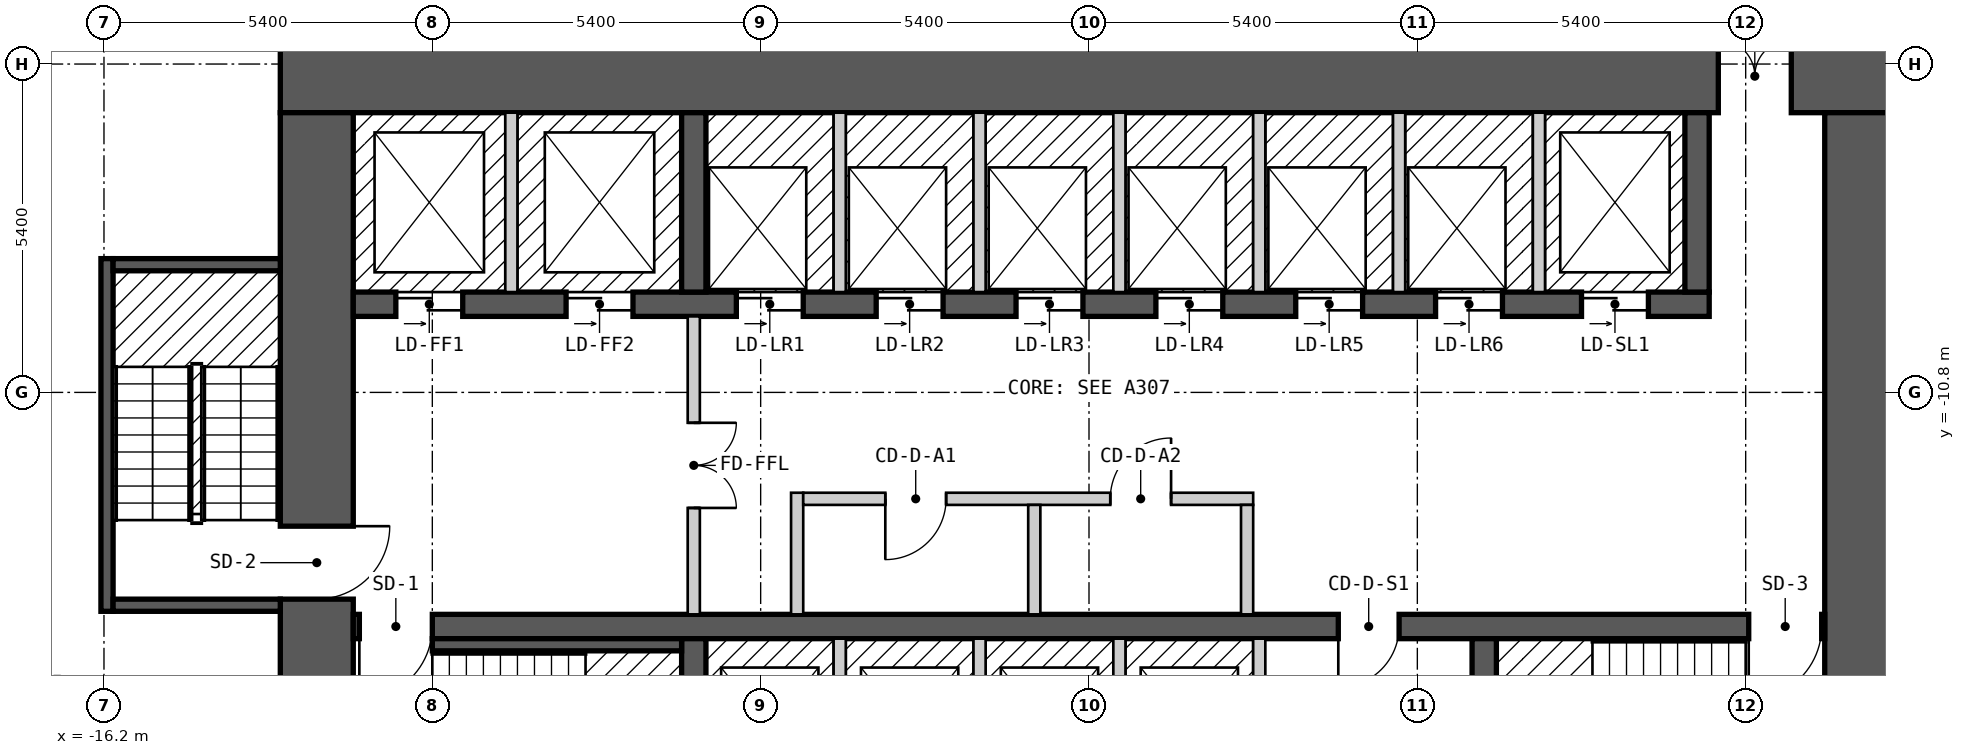
"""IFC4 building model, lengths in metres.
Left out: names, types, materials, properties, quantities, classifications, styles, units other than length and angle.
Written with IfcOpenShell. Run it as: python <this file> out.ifc"""

import sys

from ifc_helpers import new_model, si_unit, direction, frame, frame_2d, origin, place, context, subcontext, project, spatial, rectangle, extrude, element, fill, save


model = new_model("IFC4")
c1 = context("Model", 3, precision=1e-05, world=origin(), true_north=direction((0.0, 1.0)))
c2 = subcontext(c1, "Body", "Model", "MODEL_VIEW")
j1 = project(units=[si_unit("LENGTHUNIT", "METRE"), si_unit("PLANEANGLEUNIT", "RADIAN")], contexts=[c1])
p1 = place(None, origin())
s1 = spatial("IfcSite", under=j1, at=p1, CompositionType="ELEMENT")
p2 = place(p1, origin())
s2 = spatial("IfcBuilding", under=s1, at=p2, CompositionType="ELEMENT")
p3 = place(p2, frame((0.0, 0.0, 16.2)))
s3 = spatial("IfcBuildingStorey", under=s2, at=p3, CompositionType="ELEMENT", Elevation=16.2)
p4 = place(p3, frame((-13.3, -5.6, 0.0), z_axis=(0.0, 0.0, 1.0), x_axis=(1.0, 0.0, 0.0)))
e1 = element("IfcWall", 1, at=p4, inside=s3, PredefinedType="SHEAR", context=c2, shape_type="SweptSolid", body=[
    extrude(rectangle(XDim=26.6, YDim=1.2, at=frame_2d((13.3, 0.0))), origin(), (0.0, 0.0, 1.0), 3.25),
])
p5 = place(p4, frame((23.65, 0.0, 0.0)))
e2 = element("IfcOpeningElement", 2, at=p5, cuts=e1, PredefinedType="OPENING", context=c2, shape_type="SweptSolid", body=[
    extrude(rectangle(XDim=1.2, YDim=2.1, at=frame_2d((0.6, 1.05))), frame((0.0, 0.61, 0.0), z_axis=(0.0, -1.0, 0.0), x_axis=(1.0, 0.0, 0.0)), (0.0, 0.0, 1.0), 1.22),
])
p6 = place(p3, frame((-12.7, -17.8, 0.0), z_axis=(0.0, 0.0, 1.0), x_axis=(0.0, 1.0, 0.0)))
e3 = element("IfcWall", 3, at=p6, inside=s3, PredefinedType="SHEAR", context=c2, shape_type="SweptSolid", body=[
    extrude(rectangle(XDim=11.6, YDim=1.2, at=frame_2d((5.8, 0.0))), origin(), (0.0, 0.0, 1.0), 3.25),
])
p7 = place(p6, frame((3.6, 0.0, 0.0)))
e4 = element("IfcOpeningElement", 4, at=p7, cuts=e3, PredefinedType="OPENING", context=c2, shape_type="SweptSolid", body=[
    extrude(rectangle(XDim=1.2, YDim=2.1, at=frame_2d((0.6, 1.05))), frame((0.0, 0.61, 0.0), z_axis=(0.0, -1.0, 0.0), x_axis=(1.0, 0.0, 0.0)), (0.0, 0.0, 1.0), 1.22),
])
p8 = place(p3, frame((12.7, -17.8, 0.0), z_axis=(0.0, 0.0, 1.0), x_axis=(0.0, 1.0, 0.0)))
e5 = element("IfcWall", 5, at=p8, inside=s3, PredefinedType="SHEAR", context=c2, shape_type="SweptSolid", body=[
    extrude(rectangle(XDim=11.6, YDim=1.2, at=frame_2d((5.8, 0.0))), origin(), (0.0, 0.0, 1.0), 3.25),
])
p9 = place(p3, frame((-12.1, -14.65, 0.0), z_axis=(0.0, 0.0, 1.0), x_axis=(1.0, 0.0, 0.0)))
e6 = element("IfcWall", 6, at=p9, inside=s3, PredefinedType="SHEAR", context=c2, shape_type="SweptSolid", body=[
    extrude(rectangle(XDim=24.2, YDim=0.4, at=frame_2d((12.1, 0.0))), origin(), (0.0, 0.0, 1.0), 3.25),
])
p10 = place(p9, frame((1.3, 0.0, 0.0), z_axis=(0.0, 0.0, 1.0), x_axis=(-1.0, 0.0, 0.0)))
e7 = element("IfcOpeningElement", 7, at=p10, cuts=e6, PredefinedType="OPENING", context=c2, shape_type="SweptSolid", body=[
    extrude(rectangle(XDim=1.2, YDim=2.1, at=frame_2d((0.6, 1.05))), frame((0.0, 0.21, 0.0), z_axis=(0.0, -1.0, 0.0), x_axis=(1.0, 0.0, 0.0)), (0.0, 0.0, 1.0), 0.42),
])
p11 = place(p9, frame((24.15, 0.0, 0.0), z_axis=(0.0, 0.0, 1.0), x_axis=(-1.0, 0.0, 0.0)))
e8 = element("IfcOpeningElement", 8, at=p11, cuts=e6, PredefinedType="OPENING", context=c2, shape_type="SweptSolid", body=[
    extrude(rectangle(XDim=1.2, YDim=2.1, at=frame_2d((0.6, 1.05))), frame((0.0, 0.21, 0.0), z_axis=(0.0, -1.0, 0.0), x_axis=(1.0, 0.0, 0.0)), (0.0, 0.0, 1.0), 0.42),
])
p12 = place(p9, frame((17.2, 0.0, 0.0), z_axis=(0.0, 0.0, 1.0), x_axis=(-1.0, 0.0, 0.0)))
e9 = element("IfcOpeningElement", 9, at=p12, cuts=e6, PredefinedType="OPENING", context=c2, shape_type="SweptSolid", body=[
    extrude(rectangle(XDim=1.0, YDim=2.1, at=frame_2d((0.5, 1.05))), frame((0.0, 0.21, 0.0), z_axis=(0.0, -1.0, 0.0), x_axis=(1.0, 0.0, 0.0)), (0.0, 0.0, 1.0), 0.42),
])
p13 = place(p3, frame((-12.1, -9.35, 0.0), z_axis=(0.0, 0.0, 1.0), x_axis=(1.0, 0.0, 0.0)))
e10 = element("IfcWall", 10, at=p13, inside=s3, PredefinedType="SHEAR", context=c2, shape_type="SweptSolid", body=[
    extrude(rectangle(XDim=22.3, YDim=0.4, at=frame_2d((11.15, 0.0))), origin(), (0.0, 0.0, 1.0), 3.25),
])
p14 = place(p13, frame((0.7, 0.0, 0.0)))
e11 = element("IfcOpeningElement", 11, at=p14, cuts=e10, PredefinedType="OPENING", context=c2, shape_type="SweptSolid", body=[
    extrude(rectangle(XDim=1.1, YDim=2.1, at=frame_2d((0.55, 1.05))), frame((0.0, 0.21, 0.0), z_axis=(0.0, -1.0, 0.0), x_axis=(1.0, 0.0, 0.0)), (0.0, 0.0, 1.0), 0.42),
])
p15 = place(p13, frame((3.5, 0.0, 0.0)))
e12 = element("IfcOpeningElement", 12, at=p15, cuts=e10, PredefinedType="OPENING", context=c2, shape_type="SweptSolid", body=[
    extrude(rectangle(XDim=1.1, YDim=2.1, at=frame_2d((0.55, 1.05))), frame((0.0, 0.21, 0.0), z_axis=(0.0, -1.0, 0.0), x_axis=(1.0, 0.0, 0.0)), (0.0, 0.0, 1.0), 0.42),
])
p16 = place(p13, frame((6.3, 0.0, 0.0)))
e13 = element("IfcOpeningElement", 13, at=p16, cuts=e10, PredefinedType="OPENING", context=c2, shape_type="SweptSolid", body=[
    extrude(rectangle(XDim=1.1, YDim=2.1, at=frame_2d((0.55, 1.05))), frame((0.0, 0.21, 0.0), z_axis=(0.0, -1.0, 0.0), x_axis=(1.0, 0.0, 0.0)), (0.0, 0.0, 1.0), 0.42),
])
p17 = place(p13, frame((8.6, 0.0, 0.0)))
e14 = element("IfcOpeningElement", 14, at=p17, cuts=e10, PredefinedType="OPENING", context=c2, shape_type="SweptSolid", body=[
    extrude(rectangle(XDim=1.1, YDim=2.1, at=frame_2d((0.55, 1.05))), frame((0.0, 0.21, 0.0), z_axis=(0.0, -1.0, 0.0), x_axis=(1.0, 0.0, 0.0)), (0.0, 0.0, 1.0), 0.42),
])
p18 = place(p13, frame((10.9, 0.0, 0.0)))
e15 = element("IfcOpeningElement", 15, at=p18, cuts=e10, PredefinedType="OPENING", context=c2, shape_type="SweptSolid", body=[
    extrude(rectangle(XDim=1.1, YDim=2.1, at=frame_2d((0.55, 1.05))), frame((0.0, 0.21, 0.0), z_axis=(0.0, -1.0, 0.0), x_axis=(1.0, 0.0, 0.0)), (0.0, 0.0, 1.0), 0.42),
])
p19 = place(p13, frame((13.2, 0.0, 0.0)))
e16 = element("IfcOpeningElement", 16, at=p19, cuts=e10, PredefinedType="OPENING", context=c2, shape_type="SweptSolid", body=[
    extrude(rectangle(XDim=1.1, YDim=2.1, at=frame_2d((0.55, 1.05))), frame((0.0, 0.21, 0.0), z_axis=(0.0, -1.0, 0.0), x_axis=(1.0, 0.0, 0.0)), (0.0, 0.0, 1.0), 0.42),
])
p20 = place(p13, frame((15.5, 0.0, 0.0)))
e17 = element("IfcOpeningElement", 17, at=p20, cuts=e10, PredefinedType="OPENING", context=c2, shape_type="SweptSolid", body=[
    extrude(rectangle(XDim=1.1, YDim=2.1, at=frame_2d((0.55, 1.05))), frame((0.0, 0.21, 0.0), z_axis=(0.0, -1.0, 0.0), x_axis=(1.0, 0.0, 0.0)), (0.0, 0.0, 1.0), 0.42),
])
p21 = place(p13, frame((17.8, 0.0, 0.0)))
e18 = element("IfcOpeningElement", 18, at=p21, cuts=e10, PredefinedType="OPENING", context=c2, shape_type="SweptSolid", body=[
    extrude(rectangle(XDim=1.1, YDim=2.1, at=frame_2d((0.55, 1.05))), frame((0.0, 0.21, 0.0), z_axis=(0.0, -1.0, 0.0), x_axis=(1.0, 0.0, 0.0)), (0.0, 0.0, 1.0), 0.42),
])
p22 = place(p13, frame((20.2, 0.0, 0.0)))
e19 = element("IfcOpeningElement", 19, at=p22, cuts=e10, PredefinedType="OPENING", context=c2, shape_type="SweptSolid", body=[
    extrude(rectangle(XDim=1.1, YDim=2.1, at=frame_2d((0.55, 1.05))), frame((0.0, 0.21, 0.0), z_axis=(0.0, -1.0, 0.0), x_axis=(1.0, 0.0, 0.0)), (0.0, 0.0, 1.0), 0.42),
])
for number, where, z_axis, x_axis in (
    (20, (-6.5, -17.8, 0.0), (0.0, 0.0, 1.0), (0.0, 1.0, 0.0)),
    (21, (6.5, -17.8, 0.0), (0.0, 0.0, 1.0), (0.0, 1.0, 0.0)),
    (22, (-6.5, -9.15, 0.0), (0.0, 0.0, 1.0), (0.0, 1.0, 0.0)),
    (23, (10.0, -9.15, 0.0), (0.0, 0.0, 1.0), (0.0, 1.0, 0.0)),
):
    element("IfcWall", number, at=place(p3, frame(where, z_axis=z_axis, x_axis=x_axis)), inside=s3, PredefinedType="SHEAR", context=c2, shape_type="SweptSolid", body=[
        extrude(rectangle(XDim=2.95, YDim=0.4, at=frame_2d((1.475, 0.0))), origin(), (0.0, 0.0, 1.0), 3.25),
    ])
p23 = place(p3, frame((-16.15, -14.4, 0.0), z_axis=(0.0, 0.0, 1.0), x_axis=(0.0, 1.0, 0.0)))
e24 = element("IfcWall", 24, at=p23, inside=s3, PredefinedType="SOLIDWALL", context=c2, shape_type="SweptSolid", body=[
    extrude(rectangle(XDim=5.8, YDim=0.2, at=frame_2d((2.9, 0.0))), origin(), (0.0, 0.0, 1.0), 3.25),
])
for number, where, z_axis, x_axis in (
    (25, (-16.05, -14.3, 0.0), (0.0, 0.0, 1.0), (1.0, 0.0, 0.0)),
    (26, (-16.05, -8.7, 0.0), (0.0, 0.0, 1.0), (1.0, 0.0, 0.0)),
):
    element("IfcWall", number, at=place(p3, frame(where, z_axis=z_axis, x_axis=x_axis)), inside=s3, PredefinedType="SOLIDWALL", context=c2, shape_type="SweptSolid", body=[
        extrude(rectangle(XDim=2.75, YDim=0.2, at=frame_2d((1.375, 0.0))), origin(), (0.0, 0.0, 1.0), 3.25),
    ])
p24 = place(p3, frame((-10.8, -14.95, 0.0), z_axis=(0.0, 0.0, 1.0), x_axis=(1.0, 0.0, 0.0)))
e27 = element("IfcWall", 27, at=p24, inside=s3, PredefinedType="SOLIDWALL", context=c2, shape_type="SweptSolid", body=[
    extrude(rectangle(XDim=4.1, YDim=0.2, at=frame_2d((2.05, 0.0))), origin(), (0.0, 0.0, 1.0), 3.25),
])
p25 = place(p3, frame((-9.5, -9.15, 0.0), z_axis=(0.0, 0.0, 1.0), x_axis=(0.0, 1.0, 0.0)))
e28 = element("IfcWall", 28, at=p25, inside=s3, PredefinedType="SOLIDWALL", context=c2, shape_type="SweptSolid", body=[
    extrude(rectangle(XDim=2.95, YDim=0.2, at=frame_2d((1.475, 0.0))), origin(), (0.0, 0.0, 1.0), 3.25),
])
p26 = place(p3, frame((-6.5, -14.45, 0.0), z_axis=(0.0, 0.0, 1.0), x_axis=(0.0, 1.0, 0.0)))
e29 = element("IfcWall", 29, at=p26, inside=s3, PredefinedType="PARTITIONING", context=c2, shape_type="SweptSolid", body=[
    extrude(rectangle(XDim=4.9, YDim=0.2, at=frame_2d((2.45, 0.0))), origin(), (0.0, 0.0, 1.0), 3.25),
])
p27 = place(p26, frame((3.15, 0.0, 0.0), z_axis=(0.0, 0.0, 1.0), x_axis=(-1.0, 0.0, 0.0)))
e30 = element("IfcOpeningElement", 30, at=p27, cuts=e29, PredefinedType="OPENING", context=c2, shape_type="SweptSolid", body=[
    extrude(rectangle(XDim=1.4, YDim=2.1, at=frame_2d((0.7, 1.05))), frame((0.0, 0.11, 0.0), z_axis=(0.0, -1.0, 0.0), x_axis=(1.0, 0.0, 0.0)), (0.0, 0.0, 1.0), 0.22),
])
p28 = place(p3, frame((-4.8, -14.45, 0.0), z_axis=(0.0, 0.0, 1.0), x_axis=(0.0, 1.0, 0.0)))
e31 = element("IfcWall", 31, at=p28, inside=s3, PredefinedType="PARTITIONING", context=c2, shape_type="SweptSolid", body=[
    extrude(rectangle(XDim=2.0, YDim=0.2, at=frame_2d((1.0, 0.0))), origin(), (0.0, 0.0, 1.0), 3.25),
])
p29 = place(p3, frame((-4.7, -12.55, 0.0), z_axis=(0.0, 0.0, 1.0), x_axis=(1.0, 0.0, 0.0)))
e32 = element("IfcWall", 32, at=p29, inside=s3, PredefinedType="PARTITIONING", context=c2, shape_type="SweptSolid", body=[
    extrude(rectangle(XDim=7.4, YDim=0.2, at=frame_2d((3.7, 0.0))), origin(), (0.0, 0.0, 1.0), 3.25),
])
p30 = place(p29, frame((2.35, 0.0, 0.0), z_axis=(0.0, 0.0, 1.0), x_axis=(-1.0, 0.0, 0.0)))
e33 = element("IfcOpeningElement", 33, at=p30, cuts=e32, PredefinedType="OPENING", context=c2, shape_type="SweptSolid", body=[
    extrude(rectangle(XDim=1.0, YDim=2.1, at=frame_2d((0.5, 1.05))), frame((0.0, 0.11, 0.0), z_axis=(0.0, -1.0, 0.0), x_axis=(1.0, 0.0, 0.0)), (0.0, 0.0, 1.0), 0.22),
])
p31 = place(p29, frame((6.05, 0.0, 0.0), z_axis=(0.0, 0.0, 1.0), x_axis=(-1.0, 0.0, 0.0)))
e34 = element("IfcOpeningElement", 34, at=p31, cuts=e32, PredefinedType="OPENING", context=c2, shape_type="SweptSolid", body=[
    extrude(rectangle(XDim=1.0, YDim=2.1, at=frame_2d((0.5, 1.05))), frame((0.0, 0.11, 0.0), z_axis=(0.0, -1.0, 0.0), x_axis=(1.0, 0.0, 0.0)), (0.0, 0.0, 1.0), 0.22),
])
for number, where, z_axis, x_axis in (
    (35, (-4.1, -17.8, 0.0), (0.0, 0.0, 1.0), (0.0, 1.0, 0.0)),
    (36, (-4.1, -9.15, 0.0), (0.0, 0.0, 1.0), (0.0, 1.0, 0.0)),
    (37, (-1.8, -17.8, 0.0), (0.0, 0.0, 1.0), (0.0, 1.0, 0.0)),
    (38, (-1.8, -9.15, 0.0), (0.0, 0.0, 1.0), (0.0, 1.0, 0.0)),
):
    element("IfcWall", number, at=place(p3, frame(where, z_axis=z_axis, x_axis=x_axis)), inside=s3, PredefinedType="SOLIDWALL", context=c2, shape_type="SweptSolid", body=[
        extrude(rectangle(XDim=2.95, YDim=0.2, at=frame_2d((1.475, 0.0))), origin(), (0.0, 0.0, 1.0), 3.25),
    ])
p32 = place(p3, frame((-0.9, -14.45, 0.0), z_axis=(0.0, 0.0, 1.0), x_axis=(0.0, 1.0, 0.0)))
e39 = element("IfcWall", 39, at=p32, inside=s3, PredefinedType="PARTITIONING", context=c2, shape_type="SweptSolid", body=[
    extrude(rectangle(XDim=1.8, YDim=0.2, at=frame_2d((0.9, 0.0))), origin(), (0.0, 0.0, 1.0), 3.25),
])
for number, where, z_axis, x_axis in (
    (40, (0.5, -17.8, 0.0), (0.0, 0.0, 1.0), (0.0, 1.0, 0.0)),
    (41, (0.5, -9.15, 0.0), (0.0, 0.0, 1.0), (0.0, 1.0, 0.0)),
):
    element("IfcWall", number, at=place(p3, frame(where, z_axis=z_axis, x_axis=x_axis)), inside=s3, PredefinedType="SOLIDWALL", context=c2, shape_type="SweptSolid", body=[
        extrude(rectangle(XDim=2.95, YDim=0.2, at=frame_2d((1.475, 0.0))), origin(), (0.0, 0.0, 1.0), 3.25),
    ])
p33 = place(p3, frame((2.6, -14.45, 0.0), z_axis=(0.0, 0.0, 1.0), x_axis=(0.0, 1.0, 0.0)))
e42 = element("IfcWall", 42, at=p33, inside=s3, PredefinedType="PARTITIONING", context=c2, shape_type="SweptSolid", body=[
    extrude(rectangle(XDim=1.8, YDim=0.2, at=frame_2d((0.9, 0.0))), origin(), (0.0, 0.0, 1.0), 3.25),
])
for number, where, z_axis, x_axis in (
    (43, (2.8, -17.8, 0.0), (0.0, 0.0, 1.0), (0.0, 1.0, 0.0)),
    (44, (2.8, -9.15, 0.0), (0.0, 0.0, 1.0), (0.0, 1.0, 0.0)),
    (45, (5.1, -9.15, 0.0), (0.0, 0.0, 1.0), (0.0, 1.0, 0.0)),
    (46, (7.4, -9.15, 0.0), (0.0, 0.0, 1.0), (0.0, 1.0, 0.0)),
):
    element("IfcWall", number, at=place(p3, frame(where, z_axis=z_axis, x_axis=x_axis)), inside=s3, PredefinedType="SOLIDWALL", context=c2, shape_type="SweptSolid", body=[
        extrude(rectangle(XDim=2.95, YDim=0.2, at=frame_2d((1.475, 0.0))), origin(), (0.0, 0.0, 1.0), 3.25),
    ])
p34 = place(p14, origin())
e47 = element("IfcDoor", 47, at=p34, inside=s3, OperationType="DOUBLE_DOOR_SLIDING", PredefinedType="DOOR", context=c2, shape_type="SweptSolid", body=[
    extrude(rectangle(XDim=1.1, YDim=2.1, at=frame_2d((0.55, 1.05))), frame((0.0, 0.025, 0.0), z_axis=(0.0, -1.0, 0.0), x_axis=(1.0, 0.0, 0.0)), (0.0, 0.0, 1.0), 0.05),
])
fill(e11, e47)
p35 = place(p15, origin())
e48 = element("IfcDoor", 48, at=p35, inside=s3, OperationType="DOUBLE_DOOR_SLIDING", PredefinedType="DOOR", context=c2, shape_type="SweptSolid", body=[
    extrude(rectangle(XDim=1.1, YDim=2.1, at=frame_2d((0.55, 1.05))), frame((0.0, 0.025, 0.0), z_axis=(0.0, -1.0, 0.0), x_axis=(1.0, 0.0, 0.0)), (0.0, 0.0, 1.0), 0.05),
])
fill(e12, e48)
p36 = place(p16, origin())
e49 = element("IfcDoor", 49, at=p36, inside=s3, OperationType="DOUBLE_DOOR_SLIDING", PredefinedType="DOOR", context=c2, shape_type="SweptSolid", body=[
    extrude(rectangle(XDim=1.1, YDim=2.1, at=frame_2d((0.55, 1.05))), frame((0.0, 0.025, 0.0), z_axis=(0.0, -1.0, 0.0), x_axis=(1.0, 0.0, 0.0)), (0.0, 0.0, 1.0), 0.05),
])
fill(e13, e49)
p37 = place(p17, origin())
e50 = element("IfcDoor", 50, at=p37, inside=s3, OperationType="DOUBLE_DOOR_SLIDING", PredefinedType="DOOR", context=c2, shape_type="SweptSolid", body=[
    extrude(rectangle(XDim=1.1, YDim=2.1, at=frame_2d((0.55, 1.05))), frame((0.0, 0.025, 0.0), z_axis=(0.0, -1.0, 0.0), x_axis=(1.0, 0.0, 0.0)), (0.0, 0.0, 1.0), 0.05),
])
fill(e14, e50)
p38 = place(p18, origin())
e51 = element("IfcDoor", 51, at=p38, inside=s3, OperationType="DOUBLE_DOOR_SLIDING", PredefinedType="DOOR", context=c2, shape_type="SweptSolid", body=[
    extrude(rectangle(XDim=1.1, YDim=2.1, at=frame_2d((0.55, 1.05))), frame((0.0, 0.025, 0.0), z_axis=(0.0, -1.0, 0.0), x_axis=(1.0, 0.0, 0.0)), (0.0, 0.0, 1.0), 0.05),
])
fill(e15, e51)
p39 = place(p19, origin())
e52 = element("IfcDoor", 52, at=p39, inside=s3, OperationType="DOUBLE_DOOR_SLIDING", PredefinedType="DOOR", context=c2, shape_type="SweptSolid", body=[
    extrude(rectangle(XDim=1.1, YDim=2.1, at=frame_2d((0.55, 1.05))), frame((0.0, 0.025, 0.0), z_axis=(0.0, -1.0, 0.0), x_axis=(1.0, 0.0, 0.0)), (0.0, 0.0, 1.0), 0.05),
])
fill(e16, e52)
p40 = place(p20, origin())
e53 = element("IfcDoor", 53, at=p40, inside=s3, OperationType="DOUBLE_DOOR_SLIDING", PredefinedType="DOOR", context=c2, shape_type="SweptSolid", body=[
    extrude(rectangle(XDim=1.1, YDim=2.1, at=frame_2d((0.55, 1.05))), frame((0.0, 0.025, 0.0), z_axis=(0.0, -1.0, 0.0), x_axis=(1.0, 0.0, 0.0)), (0.0, 0.0, 1.0), 0.05),
])
fill(e17, e53)
p41 = place(p21, origin())
e54 = element("IfcDoor", 54, at=p41, inside=s3, OperationType="DOUBLE_DOOR_SLIDING", PredefinedType="DOOR", context=c2, shape_type="SweptSolid", body=[
    extrude(rectangle(XDim=1.1, YDim=2.1, at=frame_2d((0.55, 1.05))), frame((0.0, 0.025, 0.0), z_axis=(0.0, -1.0, 0.0), x_axis=(1.0, 0.0, 0.0)), (0.0, 0.0, 1.0), 0.05),
])
fill(e18, e54)
p42 = place(p22, origin())
e55 = element("IfcDoor", 55, at=p42, inside=s3, OperationType="DOUBLE_DOOR_SLIDING", PredefinedType="DOOR", context=c2, shape_type="SweptSolid", body=[
    extrude(rectangle(XDim=1.1, YDim=2.1, at=frame_2d((0.55, 1.05))), frame((0.0, 0.025, 0.0), z_axis=(0.0, -1.0, 0.0), x_axis=(1.0, 0.0, 0.0)), (0.0, 0.0, 1.0), 0.05),
])
fill(e19, e55)
p43 = place(p10, origin())
e56 = element("IfcDoor", 56, at=p43, inside=s3, OperationType="SINGLE_SWING_RIGHT", PredefinedType="DOOR", context=c2, shape_type="SweptSolid", body=[
    extrude(rectangle(XDim=1.2, YDim=2.1, at=frame_2d((0.6, 1.05))), frame((0.0, 0.025, 0.0), z_axis=(0.0, -1.0, 0.0), x_axis=(1.0, 0.0, 0.0)), (0.0, 0.0, 1.0), 0.05),
])
fill(e7, e56)
p44 = place(p11, origin())
e57 = element("IfcDoor", 57, at=p44, inside=s3, OperationType="SINGLE_SWING_RIGHT", PredefinedType="DOOR", context=c2, shape_type="SweptSolid", body=[
    extrude(rectangle(XDim=1.2, YDim=2.1, at=frame_2d((0.6, 1.05))), frame((0.0, 0.025, 0.0), z_axis=(0.0, -1.0, 0.0), x_axis=(1.0, 0.0, 0.0)), (0.0, 0.0, 1.0), 0.05),
])
fill(e8, e57)
p45 = place(p7, origin())
e58 = element("IfcDoor", 58, at=p45, inside=s3, OperationType="SINGLE_SWING_RIGHT", PredefinedType="DOOR", context=c2, shape_type="SweptSolid", body=[
    extrude(rectangle(XDim=1.2, YDim=2.1, at=frame_2d((0.6, 1.05))), frame((0.0, 0.025, 0.0), z_axis=(0.0, -1.0, 0.0), x_axis=(1.0, 0.0, 0.0)), (0.0, 0.0, 1.0), 0.05),
])
fill(e4, e58)
p46 = place(p27, origin())
e59 = element("IfcDoor", 59, at=p46, inside=s3, OperationType="DOUBLE_DOOR_SINGLE_SWING", PredefinedType="DOOR", context=c2, shape_type="SweptSolid", body=[
    extrude(rectangle(XDim=1.4, YDim=2.1, at=frame_2d((0.7, 1.05))), frame((0.0, 0.025, 0.0), z_axis=(0.0, -1.0, 0.0), x_axis=(1.0, 0.0, 0.0)), (0.0, 0.0, 1.0), 0.05),
])
fill(e30, e59)
p47 = place(p5, origin())
e60 = element("IfcDoor", 60, at=p47, inside=s3, OperationType="DOUBLE_DOOR_SINGLE_SWING", PredefinedType="DOOR", context=c2, shape_type="SweptSolid", body=[
    extrude(rectangle(XDim=1.2, YDim=2.1, at=frame_2d((0.6, 1.05))), frame((0.0, 0.025, 0.0), z_axis=(0.0, -1.0, 0.0), x_axis=(1.0, 0.0, 0.0)), (0.0, 0.0, 1.0), 0.05),
])
fill(e2, e60)
p48 = place(p30, origin())
e61 = element("IfcDoor", 61, at=p48, inside=s3, OperationType="SINGLE_SWING_RIGHT", PredefinedType="DOOR", context=c2, shape_type="SweptSolid", body=[
    extrude(rectangle(XDim=1.0, YDim=2.1, at=frame_2d((0.5, 1.05))), frame((0.0, 0.025, 0.0), z_axis=(0.0, -1.0, 0.0), x_axis=(1.0, 0.0, 0.0)), (0.0, 0.0, 1.0), 0.05),
])
fill(e33, e61)
p49 = place(p31, origin())
e62 = element("IfcDoor", 62, at=p49, inside=s3, OperationType="SINGLE_SWING_LEFT", PredefinedType="DOOR", context=c2, shape_type="SweptSolid", body=[
    extrude(rectangle(XDim=1.0, YDim=2.1, at=frame_2d((0.5, 1.05))), frame((0.0, 0.025, 0.0), z_axis=(0.0, -1.0, 0.0), x_axis=(1.0, 0.0, 0.0)), (0.0, 0.0, 1.0), 0.05),
])
fill(e34, e62)
p50 = place(p12, origin())
e63 = element("IfcDoor", 63, at=p50, inside=s3, OperationType="SINGLE_SWING_RIGHT", PredefinedType="DOOR", context=c2, shape_type="SweptSolid", body=[
    extrude(rectangle(XDim=1.0, YDim=2.1, at=frame_2d((0.5, 1.05))), frame((0.0, 0.025, 0.0), z_axis=(0.0, -1.0, 0.0), x_axis=(1.0, 0.0, 0.0)), (0.0, 0.0, 1.0), 0.05),
])
fill(e9, e63)
save(model, sys.argv[1])
